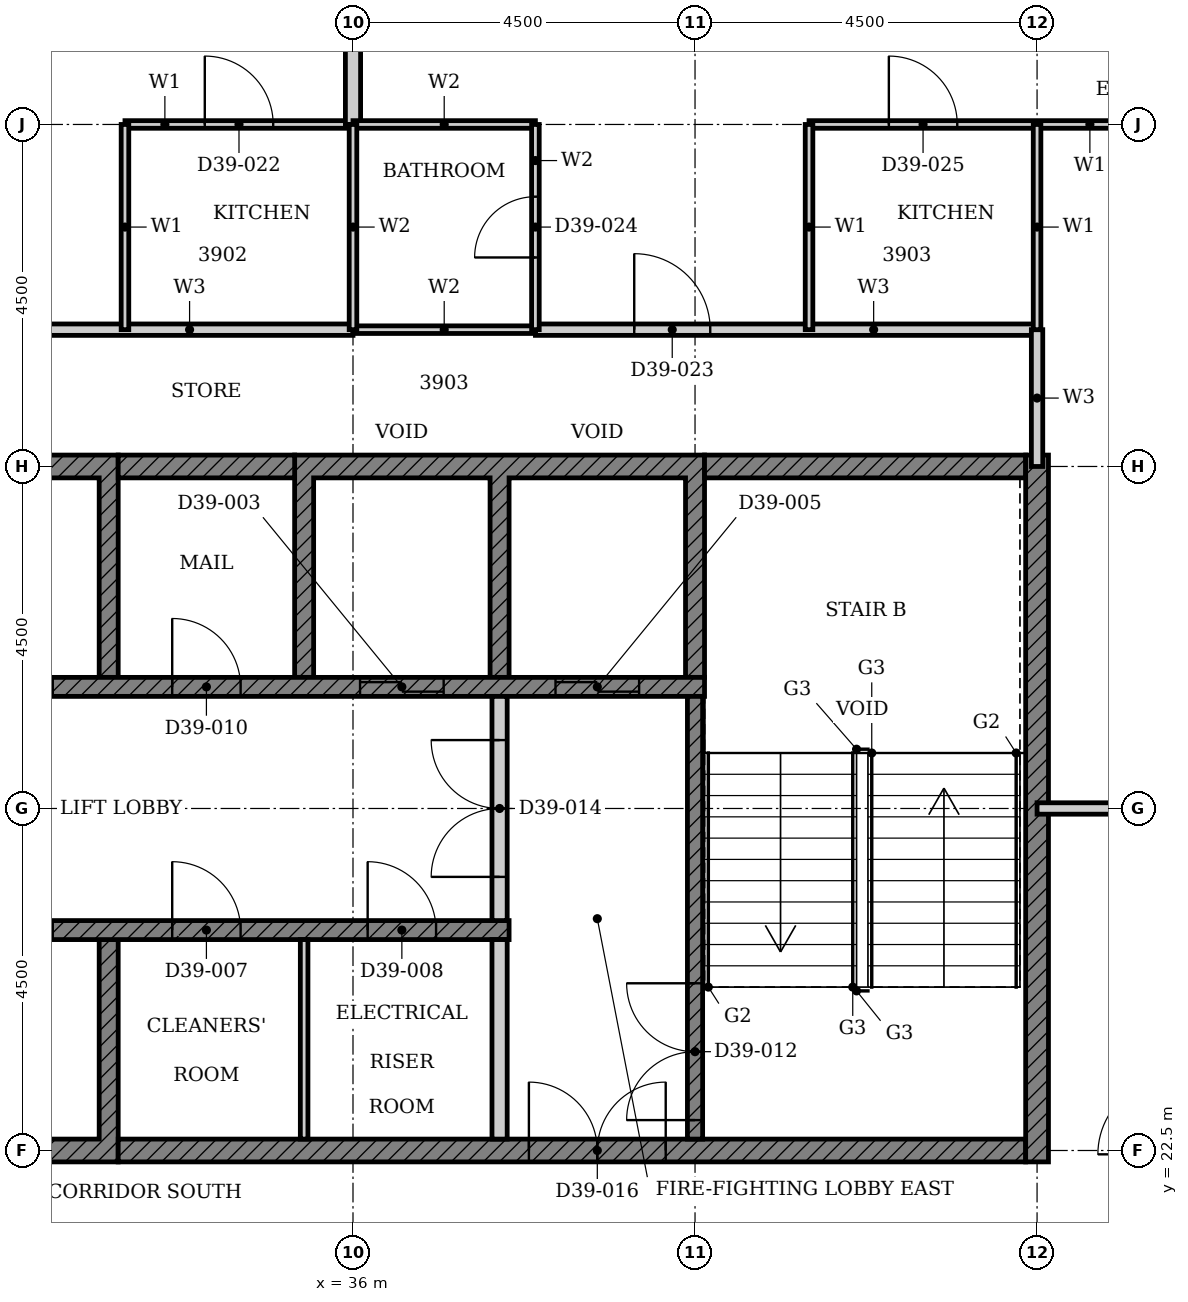
"""IFC4 building model, lengths in metres.
Left out: names, types, materials, properties, quantities, classifications, styles, units other than length and angle.
Written with IfcOpenShell. Run it as: python <this file> out.ifc"""

import sys

from ifc_helpers import new_model, si_unit, direction, frame, frame_2d, origin, place, context, subcontext, project, spatial, polyline, rectangle, outline, extrude, element, fill, save


model = new_model("IFC4")
c1 = context("Model", 3, precision=1e-05, world=origin(), true_north=direction((0.0, 1.0)))
c2 = subcontext(c1, "Body", "Model", "MODEL_VIEW")
j1 = project(units=[si_unit("LENGTHUNIT", "METRE"), si_unit("PLANEANGLEUNIT", "RADIAN")], contexts=[c1])
p1 = place(None, origin())
s1 = spatial("IfcSite", under=j1, at=p1, CompositionType="ELEMENT")
p2 = place(p1, origin())
s2 = spatial("IfcBuilding", under=s1, at=p2, CompositionType="ELEMENT")
p3 = place(p2, frame((0.0, 0.0, 158.0)))
s3 = spatial("IfcBuildingStorey", under=s2, at=p3, CompositionType="ELEMENT", Elevation=158.0)
p4 = place(p3, origin())
e1 = element("IfcWall", 1, at=p4, inside=s3, PredefinedType="SHEAR", context=c2, shape_type="SweptSolid", body=[
    extrude(outline(polyline([(27.518, 22.35), (32.911, 22.35), (32.911, 25.275), (32.661, 25.275), (32.661, 22.65), (30.339, 22.65), (30.339, 25.275), (30.089, 25.275), (30.089, 22.65), (27.768, 22.65), (27.768, 25.275), (27.518, 25.275), (27.518, 22.35)])), origin(), (0.0, 0.0, 1.0), 3.4),
])
p5 = place(p3, origin())
e2 = element("IfcWall", 2, at=p5, inside=s3, PredefinedType="SHEAR", context=c2, shape_type="SweptSolid", body=[
    extrude(outline(polyline([(27.518, 28.725), (27.768, 28.725), (27.768, 31.35), (30.089, 31.35), (30.089, 28.725), (30.339, 28.725), (30.339, 31.35), (32.661, 31.35), (32.661, 28.725), (32.911, 28.725), (32.911, 31.65), (27.518, 31.65), (27.518, 28.725)])), origin(), (0.0, 0.0, 1.0), 3.4),
])
p6 = place(p3, origin())
e3 = element("IfcWall", 3, at=p6, inside=s3, PredefinedType="SHEAR", context=c2, shape_type="SweptSolid", body=[
    extrude(outline(polyline([(35.232, 28.725), (35.482, 28.725), (35.482, 31.35), (37.803, 31.35), (37.803, 28.725), (38.053, 28.725), (38.053, 31.35), (40.375, 31.35), (40.375, 28.725), (40.625, 28.725), (40.625, 31.65), (35.232, 31.65), (35.232, 28.725)])), origin(), (0.0, 0.0, 1.0), 3.4),
])
p7 = place(p3, frame((32.911, 22.5, 0.0), z_axis=(0.0, 0.0, 1.0), x_axis=(1.0, 0.0, 0.0)))
e4 = element("IfcWall", 4, at=p7, inside=s3, PredefinedType="SHEAR", context=c2, shape_type="SweptSolid", body=[
    extrude(rectangle(XDim=11.939, YDim=0.3, at=frame_2d((5.97, 0.0))), origin(), (0.0, 0.0, 1.0), 3.4),
])
p8 = place(p7, frame((5.404, 0.0, 0.0)))
e5 = element("IfcOpeningElement", 5, at=p8, cuts=e4, PredefinedType="OPENING", context=c2, shape_type="SweptSolid", body=[
    extrude(rectangle(XDim=1.8, YDim=2.1, at=frame_2d((0.9, 1.05))), frame((0.0, 0.16, 0.0), z_axis=(0.0, -1.0, 0.0), x_axis=(1.0, 0.0, 0.0)), (0.0, 0.0, 1.0), 0.32),
])
p9 = place(p3, frame((32.911, 31.5, 0.0), z_axis=(0.0, 0.0, 1.0), x_axis=(1.0, 0.0, 0.0)))
e6 = element("IfcWall", 6, at=p9, inside=s3, PredefinedType="SHEAR", context=c2, shape_type="SweptSolid", body=[
    extrude(rectangle(XDim=2.322, YDim=0.3, at=frame_2d((1.161, 0.0))), origin(), (0.0, 0.0, 1.0), 3.4),
])
p10 = place(p3, frame((40.625, 31.5, 0.0), z_axis=(0.0, 0.0, 1.0), x_axis=(1.0, 0.0, 0.0)))
e7 = element("IfcWall", 7, at=p10, inside=s3, PredefinedType="SHEAR", context=c2, shape_type="SweptSolid", body=[
    extrude(rectangle(XDim=4.225, YDim=0.3, at=frame_2d((2.113, 0.0))), origin(), (0.0, 0.0, 1.0), 3.4),
])
p11 = place(p3, frame((45.0, 22.35, 0.0), z_axis=(0.0, 0.0, 1.0), x_axis=(0.0, 1.0, 0.0)))
e8 = element("IfcWall", 8, at=p11, inside=s3, PredefinedType="SHEAR", context=c2, shape_type="SweptSolid", body=[
    extrude(rectangle(XDim=9.3, YDim=0.3, at=frame_2d((4.65, 0.0))), origin(), (0.0, 0.0, 1.0), 3.4),
])
p12 = place(p3, frame((22.375, 25.4, 0.0), z_axis=(0.0, 0.0, 1.0), x_axis=(1.0, 0.0, 0.0)))
e9 = element("IfcWall", 9, at=p12, inside=s3, PredefinedType="SHEAR", context=c2, shape_type="SweptSolid", body=[
    extrude(rectangle(XDim=15.678, YDim=0.25, at=frame_2d((7.839, 0.0))), origin(), (0.0, 0.0, 1.0), 3.4),
])
p13 = place(p12, frame((8.575, 0.0, 0.0)))
e10 = element("IfcOpeningElement", 10, at=p13, cuts=e9, PredefinedType="OPENING", context=c2, shape_type="SweptSolid", body=[
    extrude(rectangle(XDim=1.1, YDim=2.1, at=frame_2d((0.55, 1.05))), frame((0.0, 0.135, 0.0), z_axis=(0.0, -1.0, 0.0), x_axis=(1.0, 0.0, 0.0)), (0.0, 0.0, 1.0), 0.27),
])
p14 = place(p12, frame((0.861, 0.0, 0.0)))
e11 = element("IfcOpeningElement", 11, at=p14, cuts=e9, PredefinedType="OPENING", context=c2, shape_type="SweptSolid", body=[
    extrude(rectangle(XDim=1.1, YDim=2.1, at=frame_2d((0.55, 1.05))), frame((0.0, 0.135, 0.0), z_axis=(0.0, -1.0, 0.0), x_axis=(1.0, 0.0, 0.0)), (0.0, 0.0, 1.0), 0.27),
])
p15 = place(p12, frame((3.532, 0.0, 0.0)))
e12 = element("IfcOpeningElement", 12, at=p15, cuts=e9, PredefinedType="OPENING", context=c2, shape_type="SweptSolid", body=[
    extrude(rectangle(XDim=0.9, YDim=2.1, at=frame_2d((0.45, 1.05))), frame((0.0, 0.135, 0.0), z_axis=(0.0, -1.0, 0.0), x_axis=(1.0, 0.0, 0.0)), (0.0, 0.0, 1.0), 0.27),
])
p16 = place(p12, frame((11.246, 0.0, 0.0)))
e13 = element("IfcOpeningElement", 13, at=p16, cuts=e9, PredefinedType="OPENING", context=c2, shape_type="SweptSolid", body=[
    extrude(rectangle(XDim=0.9, YDim=2.1, at=frame_2d((0.45, 1.05))), frame((0.0, 0.135, 0.0), z_axis=(0.0, -1.0, 0.0), x_axis=(1.0, 0.0, 0.0)), (0.0, 0.0, 1.0), 0.27),
])
p17 = place(p12, frame((13.818, 0.0, 0.0)))
e14 = element("IfcOpeningElement", 14, at=p17, cuts=e9, PredefinedType="OPENING", context=c2, shape_type="SweptSolid", body=[
    extrude(rectangle(XDim=0.9, YDim=2.1, at=frame_2d((0.45, 1.05))), frame((0.0, 0.135, 0.0), z_axis=(0.0, -1.0, 0.0), x_axis=(1.0, 0.0, 0.0)), (0.0, 0.0, 1.0), 0.27),
])
p18 = place(p3, frame((24.947, 28.6, 0.0), z_axis=(0.0, 0.0, 1.0), x_axis=(1.0, 0.0, 0.0)))
e15 = element("IfcWall", 15, at=p18, inside=s3, PredefinedType="SHEAR", context=c2, shape_type="SweptSolid", body=[
    extrude(rectangle(XDim=15.678, YDim=0.25, at=frame_2d((7.839, 0.0))), origin(), (0.0, 0.0, 1.0), 3.4),
])
p19 = place(p18, frame((6.004, 0.0, 0.0)))
e16 = element("IfcOpeningElement", 16, at=p19, cuts=e15, PredefinedType="OPENING", context=c2, shape_type="SweptSolid", body=[
    extrude(rectangle(XDim=1.1, YDim=2.1, at=frame_2d((0.55, 1.05))), frame((0.0, 0.135, 0.0), z_axis=(0.0, -1.0, 0.0), x_axis=(1.0, 0.0, 0.0)), (0.0, 0.0, 1.0), 0.27),
])
p20 = place(p18, frame((11.146, 0.0, 0.0)))
e17 = element("IfcOpeningElement", 17, at=p20, cuts=e15, PredefinedType="OPENING", context=c2, shape_type="SweptSolid", body=[
    extrude(rectangle(XDim=1.1, YDim=2.1, at=frame_2d((0.55, 1.05))), frame((0.0, 0.135, 0.0), z_axis=(0.0, -1.0, 0.0), x_axis=(1.0, 0.0, 0.0)), (0.0, 0.0, 1.0), 0.27),
])
p21 = place(p18, frame((13.718, 0.0, 0.0)))
e18 = element("IfcOpeningElement", 18, at=p21, cuts=e15, PredefinedType="OPENING", context=c2, shape_type="SweptSolid", body=[
    extrude(rectangle(XDim=1.1, YDim=2.1, at=frame_2d((0.55, 1.05))), frame((0.0, 0.135, 0.0), z_axis=(0.0, -1.0, 0.0), x_axis=(1.0, 0.0, 0.0)), (0.0, 0.0, 1.0), 0.27),
])
p22 = place(p18, frame((0.961, 0.0, 0.0)))
e19 = element("IfcOpeningElement", 19, at=p22, cuts=e15, PredefinedType="OPENING", context=c2, shape_type="SweptSolid", body=[
    extrude(rectangle(XDim=0.9, YDim=2.1, at=frame_2d((0.45, 1.05))), frame((0.0, 0.135, 0.0), z_axis=(0.0, -1.0, 0.0), x_axis=(1.0, 0.0, 0.0)), (0.0, 0.0, 1.0), 0.27),
])
p23 = place(p18, frame((8.675, 0.0, 0.0)))
e20 = element("IfcOpeningElement", 20, at=p23, cuts=e15, PredefinedType="OPENING", context=c2, shape_type="SweptSolid", body=[
    extrude(rectangle(XDim=0.9, YDim=2.1, at=frame_2d((0.45, 1.05))), frame((0.0, 0.135, 0.0), z_axis=(0.0, -1.0, 0.0), x_axis=(1.0, 0.0, 0.0)), (0.0, 0.0, 1.0), 0.27),
])
p24 = place(p3, frame((37.928, 22.65, 0.0), z_axis=(0.0, 0.0, 1.0), x_axis=(0.0, 1.0, 0.0)))
e21 = element("IfcWall", 21, at=p24, inside=s3, PredefinedType="PARTITIONING", context=c2, shape_type="SweptSolid", body=[
    extrude(rectangle(XDim=2.625, YDim=0.2, at=frame_2d((1.312, 0.0))), origin(), (0.0, 0.0, 1.0), 3.4),
])
p25 = place(p3, frame((35.357, 22.65, 0.0), z_axis=(0.0, 0.0, 1.0), x_axis=(0.0, 1.0, 0.0)))
e22 = element("IfcWall", 22, at=p25, inside=s3, PredefinedType="PARTITIONING", context=c2, shape_type="SweptSolid", body=[
    extrude(rectangle(XDim=2.625, YDim=0.1, at=frame_2d((1.312, 0.0))), origin(), (0.0, 0.0, 1.0), 3.4),
])
p26 = place(p3, frame((40.5, 22.65, 0.0), z_axis=(0.0, 0.0, 1.0), x_axis=(0.0, 1.0, 0.0)))
e23 = element("IfcWall", 23, at=p26, inside=s3, PredefinedType="SHEAR", context=c2, shape_type="SweptSolid", body=[
    extrude(rectangle(XDim=5.825, YDim=0.2, at=frame_2d((2.913, 0.0))), origin(), (0.0, 0.0, 1.0), 3.4),
])
p27 = place(p26, frame((0.25, 0.0, 0.0)))
e24 = element("IfcOpeningElement", 24, at=p27, cuts=e23, PredefinedType="OPENING", context=c2, shape_type="SweptSolid", body=[
    extrude(rectangle(XDim=1.8, YDim=2.1, at=frame_2d((0.9, 1.05))), frame((0.0, 0.11, 0.0), z_axis=(0.0, -1.0, 0.0), x_axis=(1.0, 0.0, 0.0)), (0.0, 0.0, 1.0), 0.22),
])
p28 = place(p3, frame((37.928, 25.525, 0.0), z_axis=(0.0, 0.0, 1.0), x_axis=(0.0, 1.0, 0.0)))
e25 = element("IfcWall", 25, at=p28, inside=s3, PredefinedType="PARTITIONING", context=c2, shape_type="SweptSolid", body=[
    extrude(rectangle(XDim=2.95, YDim=0.2, at=frame_2d((1.475, 0.0))), origin(), (0.0, 0.0, 1.0), 3.4),
])
p29 = place(p28, frame((0.575, 0.0, 0.0)))
e26 = element("IfcOpeningElement", 26, at=p29, cuts=e25, PredefinedType="OPENING", context=c2, shape_type="SweptSolid", body=[
    extrude(rectangle(XDim=1.8, YDim=2.1, at=frame_2d((0.9, 1.05))), frame((0.0, 0.11, 0.0), z_axis=(0.0, -1.0, 0.0), x_axis=(1.0, 0.0, 0.0)), (0.0, 0.0, 1.0), 0.22),
])
p30 = place(p3, frame((45.0, 27.0, 0.0), z_axis=(0.0, 0.0, 1.0), x_axis=(1.0, 0.0, 0.0)))
e27 = element("IfcWall", 27, at=p30, inside=s3, PredefinedType="PARTITIONING", context=c2, shape_type="SweptSolid", body=[
    extrude(rectangle(XDim=13.5, YDim=0.15, at=frame_2d((6.75, 0.0))), origin(), (0.0, 0.0, 1.0), 2.68),
])
p31 = place(p30, frame((7.15, 0.0, 0.0)))
e28 = element("IfcOpeningElement", 28, at=p31, cuts=e27, PredefinedType="OPENING", context=c2, shape_type="SweptSolid", body=[
    extrude(rectangle(XDim=1.0, YDim=2.1, at=frame_2d((0.5, 1.05))), frame((0.0, 0.085, 0.0), z_axis=(0.0, -1.0, 0.0), x_axis=(1.0, 0.0, 0.0)), (0.0, 0.0, 1.0), 0.17),
])
p32 = place(p3, frame((29.4, 33.3, 0.0), z_axis=(0.0, 0.0, 1.0), x_axis=(1.0, 0.0, 0.0)))
e29 = element("IfcWall", 29, at=p32, inside=s3, PredefinedType="PARTITIONING", context=c2, shape_type="SweptSolid", body=[
    extrude(rectangle(XDim=6.6, YDim=0.15, at=frame_2d((3.3, 0.0))), origin(), (0.0, 0.0, 1.0), 3.4),
])
p33 = place(p32, frame((1.3, 0.0, 0.0)))
e30 = element("IfcOpeningElement", 30, at=p33, cuts=e29, PredefinedType="OPENING", context=c2, shape_type="SweptSolid", body=[
    extrude(rectangle(XDim=1.0, YDim=2.2, at=frame_2d((0.5, 1.1))), frame((0.0, 0.085, 0.0), z_axis=(0.0, -1.0, 0.0), x_axis=(1.0, 0.0, 0.0)), (0.0, 0.0, 1.0), 0.17),
])
p34 = place(p3, frame((38.4, 33.3, 0.0), z_axis=(0.0, 0.0, 1.0), x_axis=(1.0, 0.0, 0.0)))
e31 = element("IfcWall", 31, at=p34, inside=s3, PredefinedType="PARTITIONING", context=c2, shape_type="SweptSolid", body=[
    extrude(rectangle(XDim=6.6, YDim=0.15, at=frame_2d((3.3, 0.0))), origin(), (0.0, 0.0, 1.0), 3.4),
])
p35 = place(p34, frame((1.3, 0.0, 0.0)))
e32 = element("IfcOpeningElement", 32, at=p35, cuts=e31, PredefinedType="OPENING", context=c2, shape_type="SweptSolid", body=[
    extrude(rectangle(XDim=1.0, YDim=2.2, at=frame_2d((0.5, 1.1))), frame((0.0, 0.085, 0.0), z_axis=(0.0, -1.0, 0.0), x_axis=(1.0, 0.0, 0.0)), (0.0, 0.0, 1.0), 0.17),
])
p36 = place(p3, frame((45.0, 31.5, 0.0), z_axis=(0.0, 0.0, 1.0), x_axis=(0.0, 1.0, 0.0)))
e33 = element("IfcWall", 33, at=p36, inside=s3, PredefinedType="PARTITIONING", context=c2, shape_type="SweptSolid", body=[
    extrude(rectangle(XDim=1.8, YDim=0.15, at=frame_2d((0.9, 0.0))), origin(), (0.0, 0.0, 1.0), 3.4),
])
p37 = place(p3, frame((33.0, 36.0, 0.0), z_axis=(0.0, 0.0, 1.0), x_axis=(1.0, 0.0, 0.0)))
e34 = element("IfcWall", 34, at=p37, inside=s3, PredefinedType="PARTITIONING", context=c2, shape_type="SweptSolid", body=[
    extrude(rectangle(XDim=3.0, YDim=0.1, at=frame_2d((1.5, 0.0))), origin(), (0.0, 0.0, 1.0), 3.4),
])
p38 = place(p37, frame((1.05, 0.0, 0.0)))
e35 = element("IfcOpeningElement", 35, at=p38, cuts=e34, PredefinedType="OPENING", context=c2, shape_type="SweptSolid", body=[
    extrude(rectangle(XDim=0.9, YDim=2.1, at=frame_2d((0.45, 1.05))), frame((0.0, 0.06, 0.0), z_axis=(0.0, -1.0, 0.0), x_axis=(1.0, 0.0, 0.0)), (0.0, 0.0, 1.0), 0.12),
])
p39 = place(p3, frame((42.0, 36.0, 0.0), z_axis=(0.0, 0.0, 1.0), x_axis=(1.0, 0.0, 0.0)))
e36 = element("IfcWall", 36, at=p39, inside=s3, PredefinedType="PARTITIONING", context=c2, shape_type="SweptSolid", body=[
    extrude(rectangle(XDim=5.44, YDim=0.1, at=frame_2d((2.72, 0.0))), origin(), (0.0, 0.0, 1.0), 3.4),
])
p40 = place(p39, frame((1.05, 0.0, 0.0)))
e37 = element("IfcOpeningElement", 37, at=p40, cuts=e36, PredefinedType="OPENING", context=c2, shape_type="SweptSolid", body=[
    extrude(rectangle(XDim=0.9, YDim=2.1, at=frame_2d((0.45, 1.05))), frame((0.0, 0.06, 0.0), z_axis=(0.0, -1.0, 0.0), x_axis=(1.0, 0.0, 0.0)), (0.0, 0.0, 1.0), 0.12),
])
for number, where, z_axis, x_axis in (
    (38, (33.0, 33.3, 0.0), (0.0, 0.0, 1.0), (0.0, 1.0, 0.0)),
    (39, (42.0, 33.3, 0.0), (0.0, 0.0, 1.0), (0.0, 1.0, 0.0)),
    (40, (45.0, 33.3, 0.0), (0.0, 0.0, 1.0), (0.0, 1.0, 0.0)),
):
    element("IfcWall", number, at=place(p3, frame(where, z_axis=z_axis, x_axis=x_axis)), inside=s3, PredefinedType="PARTITIONING", context=c2, shape_type="SweptSolid", body=[
        extrude(rectangle(XDim=2.7, YDim=0.1, at=frame_2d((1.35, 0.0))), origin(), (0.0, 0.0, 1.0), 3.4),
    ])
p41 = place(p3, frame((36.0, 36.0, 0.0), z_axis=(0.0, 0.0, 1.0), x_axis=(0.0, 1.0, 0.0)))
e41 = element("IfcWall", 41, at=p41, inside=s3, PredefinedType="PARTITIONING", context=c2, shape_type="SweptSolid", body=[
    extrude(rectangle(XDim=4.69, YDim=0.2, at=frame_2d((2.345, 0.0))), origin(), (0.0, 0.0, 1.0), 3.4),
])
for number, where, z_axis, x_axis in (
    (42, (36.0, 33.3, 0.0), (0.0, 0.0, 1.0), (1.0, 0.0, 0.0)),
    (43, (36.0, 36.0, 0.0), (0.0, 0.0, 1.0), (1.0, 0.0, 0.0)),
):
    element("IfcWall", number, at=place(p3, frame(where, z_axis=z_axis, x_axis=x_axis)), inside=s3, PredefinedType="PARTITIONING", context=c2, shape_type="SweptSolid", body=[
        extrude(rectangle(XDim=2.4, YDim=0.1, at=frame_2d((1.2, 0.0))), origin(), (0.0, 0.0, 1.0), 3.4),
    ])
p42 = place(p3, frame((36.0, 33.3, 0.0), z_axis=(0.0, 0.0, 1.0), x_axis=(0.0, 1.0, 0.0)))
e44 = element("IfcWall", 44, at=p42, inside=s3, PredefinedType="PARTITIONING", context=c2, shape_type="SweptSolid", body=[
    extrude(rectangle(XDim=2.7, YDim=0.1, at=frame_2d((1.35, 0.0))), origin(), (0.0, 0.0, 1.0), 3.4),
])
p43 = place(p3, frame((38.4, 33.3, 0.0), z_axis=(0.0, 0.0, 1.0), x_axis=(0.0, 1.0, 0.0)))
e45 = element("IfcWall", 45, at=p43, inside=s3, PredefinedType="PARTITIONING", context=c2, shape_type="SweptSolid", body=[
    extrude(rectangle(XDim=2.7, YDim=0.1, at=frame_2d((1.35, 0.0))), origin(), (0.0, 0.0, 1.0), 3.4),
])
p44 = place(p43, frame((0.95, 0.0, 0.0)))
e46 = element("IfcOpeningElement", 46, at=p44, cuts=e45, PredefinedType="OPENING", context=c2, shape_type="SweptSolid", body=[
    extrude(rectangle(XDim=0.8, YDim=2.1, at=frame_2d((0.4, 1.05))), frame((0.0, 0.06, 0.0), z_axis=(0.0, -1.0, 0.0), x_axis=(1.0, 0.0, 0.0)), (0.0, 0.0, 1.0), 0.12),
])
p45 = place(p19, origin())
e47 = element("IfcDoor", 47, at=p45, inside=s3, OperationType="DOUBLE_DOOR_SLIDING", PredefinedType="DOOR", context=c2, shape_type="SweptSolid", body=[
    extrude(rectangle(XDim=1.1, YDim=2.1, at=frame_2d((0.55, 1.05))), frame((0.0, 0.025, 0.0), z_axis=(0.0, -1.0, 0.0), x_axis=(1.0, 0.0, 0.0)), (0.0, 0.0, 1.0), 0.05),
])
fill(e16, e47)
p46 = place(p20, origin())
e48 = element("IfcDoor", 48, at=p46, inside=s3, OperationType="DOUBLE_DOOR_SLIDING", PredefinedType="DOOR", context=c2, shape_type="SweptSolid", body=[
    extrude(rectangle(XDim=1.1, YDim=2.1, at=frame_2d((0.55, 1.05))), frame((0.0, 0.025, 0.0), z_axis=(0.0, -1.0, 0.0), x_axis=(1.0, 0.0, 0.0)), (0.0, 0.0, 1.0), 0.05),
])
fill(e17, e48)
p47 = place(p21, origin())
e49 = element("IfcDoor", 49, at=p47, inside=s3, OperationType="DOUBLE_DOOR_SLIDING", PredefinedType="DOOR", context=c2, shape_type="SweptSolid", body=[
    extrude(rectangle(XDim=1.1, YDim=2.1, at=frame_2d((0.55, 1.05))), frame((0.0, 0.025, 0.0), z_axis=(0.0, -1.0, 0.0), x_axis=(1.0, 0.0, 0.0)), (0.0, 0.0, 1.0), 0.05),
])
fill(e18, e49)
p48 = place(p16, origin())
e50 = element("IfcDoor", 50, at=p48, inside=s3, OperationType="SINGLE_SWING_LEFT", PredefinedType="DOOR", context=c2, shape_type="SweptSolid", body=[
    extrude(rectangle(XDim=0.9, YDim=2.1, at=frame_2d((0.45, 1.05))), frame((0.0, 0.025, 0.0), z_axis=(0.0, -1.0, 0.0), x_axis=(1.0, 0.0, 0.0)), (0.0, 0.0, 1.0), 0.05),
])
fill(e13, e50)
p49 = place(p17, origin())
e51 = element("IfcDoor", 51, at=p49, inside=s3, OperationType="SINGLE_SWING_LEFT", PredefinedType="DOOR", context=c2, shape_type="SweptSolid", body=[
    extrude(rectangle(XDim=0.9, YDim=2.1, at=frame_2d((0.45, 1.05))), frame((0.0, 0.025, 0.0), z_axis=(0.0, -1.0, 0.0), x_axis=(1.0, 0.0, 0.0)), (0.0, 0.0, 1.0), 0.05),
])
fill(e14, e51)
p50 = place(p23, origin())
e52 = element("IfcDoor", 52, at=p50, inside=s3, OperationType="SINGLE_SWING_LEFT", PredefinedType="DOOR", context=c2, shape_type="SweptSolid", body=[
    extrude(rectangle(XDim=0.9, YDim=2.1, at=frame_2d((0.45, 1.05))), frame((0.0, 0.025, 0.0), z_axis=(0.0, -1.0, 0.0), x_axis=(1.0, 0.0, 0.0)), (0.0, 0.0, 1.0), 0.05),
])
fill(e20, e52)
p51 = place(p27, origin())
e53 = element("IfcDoor", 53, at=p51, inside=s3, OperationType="DOUBLE_DOOR_SINGLE_SWING", PredefinedType="DOOR", context=c2, shape_type="SweptSolid", body=[
    extrude(rectangle(XDim=1.8, YDim=2.1, at=frame_2d((0.9, 1.05))), frame((0.0, 0.025, 0.0), z_axis=(0.0, -1.0, 0.0), x_axis=(1.0, 0.0, 0.0)), (0.0, 0.0, 1.0), 0.05),
])
fill(e24, e53)
p52 = place(p29, origin())
e54 = element("IfcDoor", 54, at=p52, inside=s3, OperationType="DOUBLE_DOOR_SINGLE_SWING", PredefinedType="DOOR", context=c2, shape_type="SweptSolid", body=[
    extrude(rectangle(XDim=1.8, YDim=2.1, at=frame_2d((0.9, 1.05))), frame((0.0, 0.025, 0.0), z_axis=(0.0, -1.0, 0.0), x_axis=(1.0, 0.0, 0.0)), (0.0, 0.0, 1.0), 0.05),
])
fill(e26, e54)
p53 = place(p8, origin())
e55 = element("IfcDoor", 55, at=p53, inside=s3, OperationType="DOUBLE_DOOR_SINGLE_SWING", PredefinedType="DOOR", context=c2, shape_type="SweptSolid", body=[
    extrude(rectangle(XDim=1.8, YDim=2.1, at=frame_2d((0.9, 1.05))), frame((0.0, 0.025, 0.0), z_axis=(0.0, -1.0, 0.0), x_axis=(1.0, 0.0, 0.0)), (0.0, 0.0, 1.0), 0.05),
])
fill(e5, e55)
p54 = place(p38, origin())
e56 = element("IfcDoor", 56, at=p54, inside=s3, OperationType="SINGLE_SWING_LEFT", PredefinedType="DOOR", context=c2, shape_type="SweptSolid", body=[
    extrude(rectangle(XDim=0.9, YDim=2.1, at=frame_2d((0.45, 1.05))), frame((0.0, 0.025, 0.0), z_axis=(0.0, -1.0, 0.0), x_axis=(1.0, 0.0, 0.0)), (0.0, 0.0, 1.0), 0.05),
])
fill(e35, e56)
p55 = place(p35, origin())
e57 = element("IfcDoor", 57, at=p55, inside=s3, OperationType="SINGLE_SWING_LEFT", PredefinedType="DOOR", context=c2, shape_type="SweptSolid", body=[
    extrude(rectangle(XDim=1.0, YDim=2.2, at=frame_2d((0.5, 1.1))), frame((0.0, 0.025, 0.0), z_axis=(0.0, -1.0, 0.0), x_axis=(1.0, 0.0, 0.0)), (0.0, 0.0, 1.0), 0.05),
])
fill(e32, e57)
p56 = place(p44, origin())
e58 = element("IfcDoor", 58, at=p56, inside=s3, OperationType="SINGLE_SWING_RIGHT", PredefinedType="DOOR", context=c2, shape_type="SweptSolid", body=[
    extrude(rectangle(XDim=0.8, YDim=2.1, at=frame_2d((0.4, 1.05))), frame((0.0, 0.025, 0.0), z_axis=(0.0, -1.0, 0.0), x_axis=(1.0, 0.0, 0.0)), (0.0, 0.0, 1.0), 0.05),
])
fill(e46, e58)
p57 = place(p40, origin())
e59 = element("IfcDoor", 59, at=p57, inside=s3, OperationType="SINGLE_SWING_LEFT", PredefinedType="DOOR", context=c2, shape_type="SweptSolid", body=[
    extrude(rectangle(XDim=0.9, YDim=2.1, at=frame_2d((0.45, 1.05))), frame((0.0, 0.025, 0.0), z_axis=(0.0, -1.0, 0.0), x_axis=(1.0, 0.0, 0.0)), (0.0, 0.0, 1.0), 0.05),
])
fill(e37, e59)
save(model, sys.argv[1])
